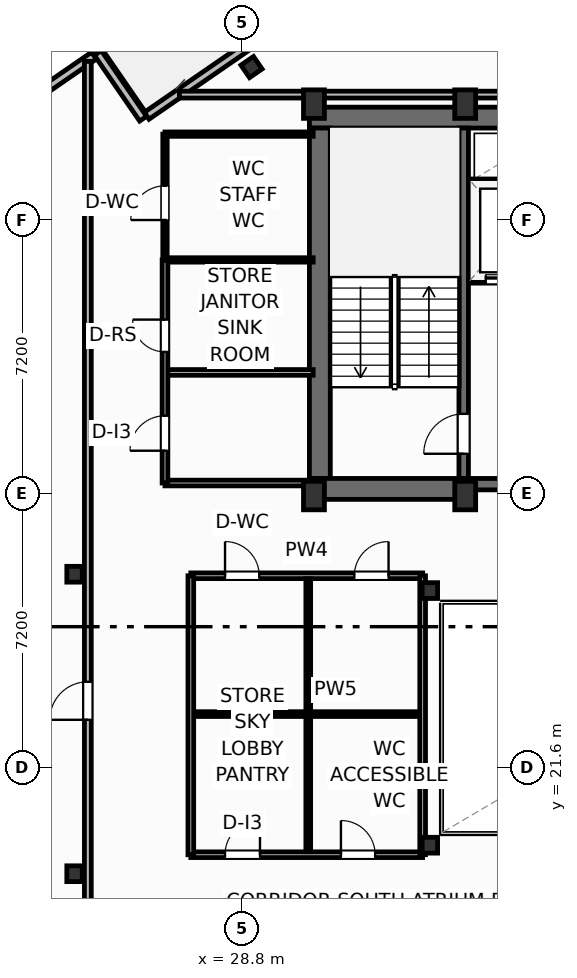
"""IFC4 building model, lengths in metres.
Left out: names, types, materials, properties, quantities, classifications, styles, units other than length and angle.
Written with IfcOpenShell. Run it as: python <this file> out.ifc"""

import sys

from ifc_helpers import new_model, si_unit, direction, frame, frame_2d, origin, origin_2d, place, context, subcontext, project, spatial, rectangle, i_section, extrude, element, fill, save


model = new_model("IFC4")
c1 = context("Model", 3, precision=1e-05, world=origin(), true_north=direction((0.0, 1.0)))
c2 = subcontext(c1, "Body", "Model", "MODEL_VIEW")
j1 = project(units=[si_unit("LENGTHUNIT", "METRE"), si_unit("PLANEANGLEUNIT", "RADIAN")], contexts=[c1])
p1 = place(None, origin())
s1 = spatial("IfcSite", under=j1, at=p1, CompositionType="ELEMENT")
p2 = place(p1, origin())
s2 = spatial("IfcBuilding", under=s1, at=p2, CompositionType="ELEMENT")
p3 = place(p2, frame((0.0, 0.0, 287.8)))
s3 = spatial("IfcBuildingStorey", under=s2, at=p3, CompositionType="ELEMENT", Elevation=287.8)
for number, where, z_axis, x_axis in (
    (1, (30.7, 28.75, 0.0), (0.0, 0.0, 1.0), (1.0, 0.0, 0.0)),
    (2, (34.68, 28.75, 0.0), (0.0, 0.0, 1.0), (1.0, 0.0, 0.0)),
    (3, (30.7, 39.05, 0.0), (0.0, 0.0, 1.0), (1.0, 0.0, 0.0)),
    (4, (34.68, 39.05, 0.0), (0.0, 0.0, 1.0), (1.0, 0.0, 0.0)),
):
    element("IfcColumn", number, at=place(p3, frame(where, z_axis=z_axis, x_axis=x_axis)), inside=s3, PredefinedType="COLUMN", context=c2, shape_type="SweptSolid", body=[
        extrude(rectangle(XDim=0.55, YDim=0.75, at=origin_2d()), origin(), (0.0, 0.0, 1.0), 3.7),
    ])
for number, where, z_axis, x_axis in (
    (5, (33.75, 19.55, 0.0), (0.0, 0.0, 1.0), (1.0, 0.0, 0.0)),
    (6, (33.75, 26.25, 0.0), (0.0, 0.0, 1.0), (1.0, 0.0, 0.0)),
    (7, (24.4, 18.8, 0.0), (0.0, 0.0, 1.0), (1.0, 0.0, 0.0)),
    (8, (24.4, 26.68, 0.0), (0.0, 0.0, 1.0), (1.0, 0.0, 0.0)),
):
    element("IfcColumn", number, at=place(p3, frame(where, z_axis=z_axis, x_axis=x_axis)), inside=s3, PredefinedType="COLUMN", context=c2, shape_type="SweptSolid", body=[
        extrude(i_section(OverallWidth=0.406, OverallDepth=0.416, WebThickness=0.03, FlangeThickness=0.048, FilletRadius=0.025, at=origin_2d()), origin(), (0.0, 0.0, 1.0), 3.7),
    ])
p4 = place(p3, frame((30.58, 38.695, 0.0), z_axis=(0.0, 0.0, 1.0), x_axis=(1.0, 0.0, 0.0)))
e9 = element("IfcWall", 9, at=p4, inside=s3, PredefinedType="SHEAR", context=c2, shape_type="SweptSolid", body=[
    extrude(rectangle(XDim=17.24, YDim=0.55, at=frame_2d((8.62, 0.0))), origin(), (0.0, 0.0, 1.0), 3.38),
])
p5 = place(p3, frame((30.855, 29.2, 0.0), z_axis=(0.0, 0.0, 1.0), x_axis=(0.0, 1.0, 0.0)))
e10 = element("IfcWall", 10, at=p5, inside=s3, PredefinedType="SHEAR", context=c2, shape_type="SweptSolid", body=[
    extrude(rectangle(XDim=9.22, YDim=0.55, at=frame_2d((4.61, 0.0))), origin(), (0.0, 0.0, 1.0), 3.38),
])
p6 = place(p3, frame((30.58, 28.925, 0.0), z_axis=(0.0, 0.0, 1.0), x_axis=(1.0, 0.0, 0.0)))
e11 = element("IfcWall", 11, at=p6, inside=s3, PredefinedType="SHEAR", context=c2, shape_type="SweptSolid", body=[
    extrude(rectangle(XDim=4.22, YDim=0.55, at=frame_2d((2.11, 0.0))), origin(), (0.0, 0.0, 1.0), 3.38),
])
p7 = place(p3, frame((34.8, 29.05, 0.0), z_axis=(0.0, 0.0, 1.0), x_axis=(1.0, 0.0, 0.0)))
e12 = element("IfcWall", 12, at=p7, inside=s3, PredefinedType="SHEAR", context=c2, shape_type="SweptSolid", body=[
    extrude(rectangle(XDim=8.8, YDim=0.3, at=frame_2d((4.4, 0.0))), origin(), (0.0, 0.0, 1.0), 3.38),
])
p8 = place(p7, frame((0.95, 0.0, 0.0)))
e13 = element("IfcOpeningElement", 13, at=p8, cuts=e12, PredefinedType="OPENING", context=c2, shape_type="SweptSolid", body=[
    extrude(rectangle(XDim=1.1, YDim=2.15, at=frame_2d((0.55, 1.075))), frame((0.0, 0.16, 0.0), z_axis=(0.0, -1.0, 0.0), x_axis=(1.0, 0.0, 0.0)), (0.0, 0.0, 1.0), 0.32),
])
p9 = place(p7, frame((6.75, 0.0, 0.0)))
e14 = element("IfcOpeningElement", 14, at=p9, cuts=e12, PredefinedType="OPENING", context=c2, shape_type="SweptSolid", body=[
    extrude(rectangle(XDim=1.1, YDim=2.15, at=frame_2d((0.55, 1.075))), frame((0.0, 0.16, 0.0), z_axis=(0.0, -1.0, 0.0), x_axis=(1.0, 0.0, 0.0)), (0.0, 0.0, 1.0), 0.32),
])
p10 = place(p7, frame((4.45, 0.0, 0.0)))
e15 = element("IfcOpeningElement", 15, at=p10, cuts=e12, PredefinedType="OPENING", context=c2, shape_type="SweptSolid", body=[
    extrude(rectangle(XDim=0.95, YDim=2.15, at=frame_2d((0.475, 1.075))), frame((0.0, 0.16, 0.0), z_axis=(0.0, -1.0, 0.0), x_axis=(1.0, 0.0, 0.0)), (0.0, 0.0, 1.0), 0.32),
])
p11 = place(p3, frame((34.64, 29.2, 0.0), z_axis=(0.0, 0.0, 1.0), x_axis=(0.0, 1.0, 0.0)))
e16 = element("IfcWall", 16, at=p11, inside=s3, PredefinedType="SHEAR", context=c2, shape_type="SweptSolid", body=[
    extrude(rectangle(XDim=9.22, YDim=0.25, at=frame_2d((4.61, 0.0))), origin(), (0.0, 0.0, 1.0), 3.38),
])
p12 = place(p11, frame((0.65, 0.0, 0.0)))
e17 = element("IfcOpeningElement", 17, at=p12, cuts=e16, PredefinedType="OPENING", context=c2, shape_type="SweptSolid", body=[
    extrude(rectangle(XDim=1.05, YDim=2.15, at=frame_2d((0.525, 1.075))), frame((0.0, 0.135, 0.0), z_axis=(0.0, -1.0, 0.0), x_axis=(1.0, 0.0, 0.0)), (0.0, 0.0, 1.0), 0.27),
])
p13 = place(p3, frame((29.057, 40.025, 0.0), z_axis=(0.0, 0.0, 1.0), x_axis=(0.823532597628, 0.567268949127, 0.0)))
e18 = element("IfcColumn", 18, at=p13, inside=s3, PredefinedType="COLUMN", context=c2, shape_type="SweptSolid", body=[
    extrude(i_section(OverallWidth=0.401, OverallDepth=0.399, WebThickness=0.025, FlangeThickness=0.04, FilletRadius=0.022, at=origin_2d()), origin(), (0.0, 0.0, 1.0), 3.7),
])
p14 = place(p3, frame((26.297, 38.743, 0.0), z_axis=(0.0, 0.0, 1.0), x_axis=(0.823534636215, 0.567265989598, 0.0)))
e19 = element("IfcWall", 19, at=p14, inside=s3, PredefinedType="SOLIDWALL", context=c2, shape_type="SweptSolid", body=[
    extrude(rectangle(XDim=6.0, YDim=0.22, at=frame_2d((3.0, 0.0))), origin(), (0.0, 0.0, 1.0), 2.66),
])
p15 = place(p14, frame((3.5, 0.0, 0.0)))
e20 = element("IfcOpeningElement", 20, at=p15, cuts=e19, PredefinedType="OPENING", context=c2, shape_type="SweptSolid", body=[
    extrude(rectangle(XDim=2.1, YDim=2.3, at=frame_2d((1.05, 1.15))), frame((0.0, 0.12, 0.0), z_axis=(0.0, -1.0, 0.0), x_axis=(1.0, 0.0, 0.0)), (0.0, 0.0, 1.0), 0.24),
])
p16 = place(p3, frame((26.204, 38.667, 0.0), z_axis=(0.0, 0.0, 1.0), x_axis=(-0.567219383419, 0.823566737474, 0.0)))
e21 = element("IfcWall", 21, at=p16, inside=s3, PredefinedType="SOLIDWALL", context=c2, shape_type="SweptSolid", body=[
    extrude(rectangle(XDim=2.1, YDim=0.22, at=frame_2d((1.05, 0.0))), origin(), (0.0, 0.0, 1.0), 2.66),
])
p17 = place(p3, frame((24.91, 40.325, 0.0), z_axis=(0.0, 0.0, 1.0), x_axis=(-0.823521165086, -0.56728554596, 0.0)))
e22 = element("IfcWall", 22, at=p17, inside=s3, PredefinedType="SOLIDWALL", context=c2, shape_type="SweptSolid", body=[
    extrude(rectangle(XDim=8.035, YDim=0.22, at=frame_2d((4.018, 0.0))), origin(), (0.0, 0.0, 1.0), 2.66),
])
p18 = place(p17, frame((2.817, 0.0, 0.8)))
e23 = element("IfcOpeningElement", 23, at=p18, cuts=e22, PredefinedType="OPENING", context=c2, shape_type="SweptSolid", body=[
    extrude(rectangle(XDim=2.4, YDim=1.78, at=frame_2d((1.2, 0.89))), frame((0.0, 0.12, 0.0), z_axis=(0.0, -1.0, 0.0), x_axis=(1.0, 0.0, 0.0)), (0.0, 0.0, 1.0), 0.24),
])
p19 = place(p3, frame((27.46, 26.64, 0.0), z_axis=(0.0, 0.0, 1.0), x_axis=(1.0, 0.0, 0.0)))
e24 = element("IfcWall", 24, at=p19, inside=s3, PredefinedType="PARTITIONING", context=c2, shape_type="SweptSolid", body=[
    extrude(rectangle(XDim=6.1, YDim=0.15, at=frame_2d((3.05, 0.0))), origin(), (0.0, 0.0, 1.0), 2.592),
])
p20 = place(p19, frame((0.9, 0.0, 0.0)))
e25 = element("IfcOpeningElement", 25, at=p20, cuts=e24, PredefinedType="OPENING", context=c2, shape_type="SweptSolid", body=[
    extrude(rectangle(XDim=0.9, YDim=2.05, at=frame_2d((0.45, 1.025))), frame((0.0, 0.085, 0.0), z_axis=(0.0, -1.0, 0.0), x_axis=(1.0, 0.0, 0.0)), (0.0, 0.0, 1.0), 0.17),
])
p21 = place(p19, frame((4.303, 0.0, 0.0)))
e26 = element("IfcOpeningElement", 26, at=p21, cuts=e24, PredefinedType="OPENING", context=c2, shape_type="SweptSolid", body=[
    extrude(rectangle(XDim=0.9, YDim=2.05, at=frame_2d((0.45, 1.025))), frame((0.0, 0.085, 0.0), z_axis=(0.0, -1.0, 0.0), x_axis=(1.0, 0.0, 0.0)), (0.0, 0.0, 1.0), 0.17),
])
p22 = place(p3, frame((27.46, 19.3, 0.0), z_axis=(0.0, 0.0, 1.0), x_axis=(1.0, 0.0, 0.0)))
e27 = element("IfcWall", 27, at=p22, inside=s3, PredefinedType="PARTITIONING", context=c2, shape_type="SweptSolid", body=[
    extrude(rectangle(XDim=6.1, YDim=0.15, at=frame_2d((3.05, 0.0))), origin(), (0.0, 0.0, 1.0), 2.592),
])
p23 = place(p22, frame((0.9, 0.0, 0.0)))
e28 = element("IfcOpeningElement", 28, at=p23, cuts=e27, PredefinedType="OPENING", context=c2, shape_type="SweptSolid", body=[
    extrude(rectangle(XDim=0.92, YDim=2.05, at=frame_2d((0.46, 1.025))), frame((0.0, 0.085, 0.0), z_axis=(0.0, -1.0, 0.0), x_axis=(1.0, 0.0, 0.0)), (0.0, 0.0, 1.0), 0.17),
])
p24 = place(p22, frame((3.95, 0.0, 0.0)))
e29 = element("IfcOpeningElement", 29, at=p24, cuts=e27, PredefinedType="OPENING", context=c2, shape_type="SweptSolid", body=[
    extrude(rectangle(XDim=0.9, YDim=2.05, at=frame_2d((0.45, 1.025))), frame((0.0, 0.085, 0.0), z_axis=(0.0, -1.0, 0.0), x_axis=(1.0, 0.0, 0.0)), (0.0, 0.0, 1.0), 0.17),
])
p25 = place(p3, frame((30.55, 19.38, 0.0), z_axis=(0.0, 0.0, 1.0), x_axis=(0.0, 1.0, 0.0)))
e30 = element("IfcWall", 30, at=p25, inside=s3, PredefinedType="PARTITIONING", context=c2, shape_type="SweptSolid", body=[
    extrude(rectangle(XDim=7.18, YDim=0.125, at=frame_2d((3.59, 0.0))), origin(), (0.0, 0.0, 1.0), 3.38),
])
p26 = place(p3, frame((27.52, 23.0, 0.0), z_axis=(0.0, 0.0, 1.0), x_axis=(1.0, 0.0, 0.0)))
e31 = element("IfcWall", 31, at=p26, inside=s3, PredefinedType="PARTITIONING", context=c2, shape_type="SweptSolid", body=[
    extrude(rectangle(XDim=6.0, YDim=0.125, at=frame_2d((3.0, 0.0))), origin(), (0.0, 0.0, 1.0), 3.38),
])
p27 = place(p3, frame((27.46, 19.3, 0.0), z_axis=(0.0, 0.0, 1.0), x_axis=(0.0, 1.0, 0.0)))
e32 = element("IfcWall", 32, at=p27, inside=s3, PredefinedType="PARTITIONING", context=c2, shape_type="SweptSolid", body=[
    extrude(rectangle(XDim=7.34, YDim=0.15, at=frame_2d((3.67, 0.0))), origin(), (0.0, 0.0, 1.0), 3.38),
])
p28 = place(p3, frame((33.56, 19.3, 0.0), z_axis=(0.0, 0.0, 1.0), x_axis=(0.0, 1.0, 0.0)))
e33 = element("IfcWall", 33, at=p28, inside=s3, PredefinedType="PARTITIONING", context=c2, shape_type="SweptSolid", body=[
    extrude(rectangle(XDim=7.34, YDim=0.15, at=frame_2d((3.67, 0.0))), origin(), (0.0, 0.0, 1.0), 2.754),
])
p29 = place(p3, frame((24.75, 16.85, 0.0), z_axis=(0.0, 0.0, 1.0), x_axis=(0.0, 1.0, 0.0)))
e34 = element("IfcWall", 34, at=p29, inside=s3, PredefinedType="PARTITIONING", context=c2, shape_type="SweptSolid", body=[
    extrude(rectangle(XDim=23.325, YDim=0.18, at=frame_2d((11.663, 0.0))), origin(), (0.0, 0.0, 1.0), 3.38),
])
p30 = place(p29, frame((6.0, 0.0, 0.0)))
e35 = element("IfcOpeningElement", 35, at=p30, cuts=e34, PredefinedType="OPENING", context=c2, shape_type="SweptSolid", body=[
    extrude(rectangle(XDim=1.0, YDim=2.05, at=frame_2d((0.5, 1.025))), frame((0.0, 0.1, 0.0), z_axis=(0.0, -1.0, 0.0), x_axis=(1.0, 0.0, 0.0)), (0.0, 0.0, 1.0), 0.2),
])
p31 = place(p3, frame((27.159, 39.3, 0.0), z_axis=(0.0, 0.0, 1.0), x_axis=(1.0, 0.0, 0.0)))
e36 = element("IfcWall", 36, at=p31, inside=s3, PredefinedType="PARTITIONING", context=c2, shape_type="SweptSolid", body=[
    extrude(rectangle(XDim=8.561, YDim=0.18, at=frame_2d((4.281, 0.0))), origin(), (0.0, 0.0, 1.0), 3.38),
])
p32 = place(p3, frame((34.8, 34.44, 0.0), z_axis=(0.0, 0.0, 1.0), x_axis=(1.0, 0.0, 0.0)))
e37 = element("IfcWall", 37, at=p32, inside=s3, PredefinedType="PARTITIONING", context=c2, shape_type="SweptSolid", body=[
    extrude(rectangle(XDim=2.18, YDim=0.2, at=frame_2d((1.09, 0.0))), origin(), (0.0, 0.0, 1.0), 3.38),
])
p33 = place(p32, frame((0.42, 0.0, 0.0)))
e38 = element("IfcOpeningElement", 38, at=p33, cuts=e37, PredefinedType="OPENING", context=c2, shape_type="SweptSolid", body=[
    extrude(rectangle(XDim=1.2, YDim=2.2, at=frame_2d((0.6, 1.1))), frame((0.0, 0.11, 0.0), z_axis=(0.0, -1.0, 0.0), x_axis=(1.0, 0.0, 0.0)), (0.0, 0.0, 1.0), 0.22),
])
p34 = place(p3, frame((34.8, 36.98, 0.0), z_axis=(0.0, 0.0, 1.0), x_axis=(1.0, 0.0, 0.0)))
e39 = element("IfcWall", 39, at=p34, inside=s3, PredefinedType="PARTITIONING", context=c2, shape_type="SweptSolid", body=[
    extrude(rectangle(XDim=2.18, YDim=0.2, at=frame_2d((1.09, 0.0))), origin(), (0.0, 0.0, 1.0), 3.38),
])
p35 = place(p3, frame((26.78, 29.08, 0.0), z_axis=(0.0, 0.0, 1.0), x_axis=(1.0, 0.0, 0.0)))
e40 = element("IfcWall", 40, at=p35, inside=s3, PredefinedType="PARTITIONING", context=c2, shape_type="SweptSolid", body=[
    extrude(rectangle(XDim=3.8, YDim=0.15, at=frame_2d((1.9, 0.0))), origin(), (0.0, 0.0, 1.0), 3.38),
])
p36 = place(p3, frame((26.8, 31.99, 0.0), z_axis=(0.0, 0.0, 1.0), x_axis=(1.0, 0.0, 0.0)))
e41 = element("IfcWall", 41, at=p36, inside=s3, PredefinedType="PARTITIONING", context=c2, shape_type="SweptSolid", body=[
    extrude(rectangle(XDim=3.88, YDim=0.15, at=frame_2d((1.94, 0.0))), origin(), (0.0, 0.0, 1.0), 3.38),
])
p37 = place(p3, frame((26.8, 34.95, 0.0), z_axis=(0.0, 0.0, 1.0), x_axis=(1.0, 0.0, 0.0)))
e42 = element("IfcWall", 42, at=p37, inside=s3, PredefinedType="PARTITIONING", context=c2, shape_type="SweptSolid", body=[
    extrude(rectangle(XDim=3.88, YDim=0.115, at=frame_2d((1.94, 0.0))), origin(), (0.0, 0.0, 1.0), 3.38),
])
p38 = place(p3, frame((26.78, 38.26, 0.0), z_axis=(0.0, 0.0, 1.0), x_axis=(1.0, 0.0, 0.0)))
e43 = element("IfcWall", 43, at=p38, inside=s3, PredefinedType="PARTITIONING", context=c2, shape_type="SweptSolid", body=[
    extrude(rectangle(XDim=3.9, YDim=0.115, at=frame_2d((1.95, 0.0))), origin(), (0.0, 0.0, 1.0), 3.38),
])
p39 = place(p3, frame((26.78, 29.08, 0.0), z_axis=(0.0, 0.0, 1.0), x_axis=(0.0, 1.0, 0.0)))
e44 = element("IfcWall", 44, at=p39, inside=s3, PredefinedType="PARTITIONING", context=c2, shape_type="SweptSolid", body=[
    extrude(rectangle(XDim=5.87, YDim=0.15, at=frame_2d((2.935, 0.0))), origin(), (0.0, 0.0, 1.0), 3.38),
])
p40 = place(p39, frame((0.85, 0.0, 0.0)))
e45 = element("IfcOpeningElement", 45, at=p40, cuts=e44, PredefinedType="OPENING", context=c2, shape_type="SweptSolid", body=[
    extrude(rectangle(XDim=0.92, YDim=2.05, at=frame_2d((0.46, 1.025))), frame((0.0, 0.085, 0.0), z_axis=(0.0, -1.0, 0.0), x_axis=(1.0, 0.0, 0.0)), (0.0, 0.0, 1.0), 0.17),
])
p41 = place(p39, frame((3.45, 0.0, 0.0)))
e46 = element("IfcOpeningElement", 46, at=p41, cuts=e44, PredefinedType="OPENING", context=c2, shape_type="SweptSolid", body=[
    extrude(rectangle(XDim=0.85, YDim=2.05, at=frame_2d((0.425, 1.025))), frame((0.0, 0.085, 0.0), z_axis=(0.0, -1.0, 0.0), x_axis=(1.0, 0.0, 0.0)), (0.0, 0.0, 1.0), 0.17),
])
p42 = place(p3, frame((26.78, 34.95, 0.0), z_axis=(0.0, 0.0, 1.0), x_axis=(0.0, 1.0, 0.0)))
e47 = element("IfcWall", 47, at=p42, inside=s3, PredefinedType="PARTITIONING", context=c2, shape_type="SweptSolid", body=[
    extrude(rectangle(XDim=3.31, YDim=0.115, at=frame_2d((1.655, 0.0))), origin(), (0.0, 0.0, 1.0), 3.38),
])
p43 = place(p42, frame((1.05, 0.0, 0.0)))
e48 = element("IfcOpeningElement", 48, at=p43, cuts=e47, PredefinedType="OPENING", context=c2, shape_type="SweptSolid", body=[
    extrude(rectangle(XDim=0.9, YDim=2.05, at=frame_2d((0.45, 1.025))), frame((0.0, 0.067, 0.0), z_axis=(0.0, -1.0, 0.0), x_axis=(1.0, 0.0, 0.0)), (0.0, 0.0, 1.0), 0.135),
])
p44 = place(p20, origin())
e49 = element("IfcDoor", 49, at=p44, inside=s3, OperationType="SINGLE_SWING_LEFT", PredefinedType="DOOR", context=c2, shape_type="SweptSolid", body=[
    extrude(rectangle(XDim=0.9, YDim=2.05, at=frame_2d((0.45, 1.025))), frame((0.0, 0.025, 0.0), z_axis=(0.0, -1.0, 0.0), x_axis=(1.0, 0.0, 0.0)), (0.0, 0.0, 1.0), 0.05),
])
fill(e25, e49)
p45 = place(p21, origin())
e50 = element("IfcDoor", 50, at=p45, inside=s3, OperationType="SINGLE_SWING_RIGHT", PredefinedType="DOOR", context=c2, shape_type="SweptSolid", body=[
    extrude(rectangle(XDim=0.9, YDim=2.05, at=frame_2d((0.45, 1.025))), frame((0.0, 0.025, 0.0), z_axis=(0.0, -1.0, 0.0), x_axis=(1.0, 0.0, 0.0)), (0.0, 0.0, 1.0), 0.05),
])
fill(e26, e50)
p46 = place(p23, origin())
e51 = element("IfcDoor", 51, at=p46, inside=s3, OperationType="SINGLE_SWING_RIGHT", PredefinedType="DOOR", context=c2, shape_type="SweptSolid", body=[
    extrude(rectangle(XDim=0.92, YDim=2.05, at=frame_2d((0.46, 1.025))), frame((0.0, 0.025, 0.0), z_axis=(0.0, -1.0, 0.0), x_axis=(1.0, 0.0, 0.0)), (0.0, 0.0, 1.0), 0.05),
])
fill(e28, e51)
p47 = place(p24, origin())
e52 = element("IfcDoor", 52, at=p47, inside=s3, OperationType="SINGLE_SWING_LEFT", PredefinedType="DOOR", context=c2, shape_type="SweptSolid", body=[
    extrude(rectangle(XDim=0.9, YDim=2.05, at=frame_2d((0.45, 1.025))), frame((0.0, 0.025, 0.0), z_axis=(0.0, -1.0, 0.0), x_axis=(1.0, 0.0, 0.0)), (0.0, 0.0, 1.0), 0.05),
])
fill(e29, e52)
p48 = place(p30, origin())
e53 = element("IfcDoor", 53, at=p48, inside=s3, OperationType="SINGLE_SWING_LEFT", PredefinedType="DOOR", context=c2, shape_type="SweptSolid", body=[
    extrude(rectangle(XDim=1.0, YDim=2.05, at=frame_2d((0.5, 1.025))), frame((0.0, 0.025, 0.0), z_axis=(0.0, -1.0, 0.0), x_axis=(1.0, 0.0, 0.0)), (0.0, 0.0, 1.0), 0.05),
])
fill(e35, e53)
p49 = place(p12, origin())
e54 = element("IfcDoor", 54, at=p49, inside=s3, OperationType="SINGLE_SWING_LEFT", PredefinedType="DOOR", context=c2, shape_type="SweptSolid", body=[
    extrude(rectangle(XDim=1.05, YDim=2.15, at=frame_2d((0.525, 1.075))), frame((0.0, 0.025, 0.0), z_axis=(0.0, -1.0, 0.0), x_axis=(1.0, 0.0, 0.0)), (0.0, 0.0, 1.0), 0.05),
])
fill(e17, e54)
p50 = place(p33, origin())
e55 = element("IfcDoor", 55, at=p50, inside=s3, OperationType="SLIDING_TO_LEFT", PredefinedType="DOOR", context=c2, shape_type="SweptSolid", body=[
    extrude(rectangle(XDim=1.2, YDim=2.2, at=frame_2d((0.6, 1.1))), frame((0.0, 0.025, 0.0), z_axis=(0.0, -1.0, 0.0), x_axis=(1.0, 0.0, 0.0)), (0.0, 0.0, 1.0), 0.05),
])
fill(e38, e55)
p51 = place(p40, origin())
e56 = element("IfcDoor", 56, at=p51, inside=s3, OperationType="SINGLE_SWING_LEFT", PredefinedType="DOOR", context=c2, shape_type="SweptSolid", body=[
    extrude(rectangle(XDim=0.92, YDim=2.05, at=frame_2d((0.46, 1.025))), frame((0.0, 0.025, 0.0), z_axis=(0.0, -1.0, 0.0), x_axis=(1.0, 0.0, 0.0)), (0.0, 0.0, 1.0), 0.05),
])
fill(e45, e56)
p52 = place(p41, origin())
e57 = element("IfcDoor", 57, at=p52, inside=s3, OperationType="SINGLE_SWING_RIGHT", PredefinedType="DOOR", context=c2, shape_type="SweptSolid", body=[
    extrude(rectangle(XDim=0.85, YDim=2.05, at=frame_2d((0.425, 1.025))), frame((0.0, 0.025, 0.0), z_axis=(0.0, -1.0, 0.0), x_axis=(1.0, 0.0, 0.0)), (0.0, 0.0, 1.0), 0.05),
])
fill(e46, e57)
p53 = place(p43, origin())
e58 = element("IfcDoor", 58, at=p53, inside=s3, OperationType="SINGLE_SWING_LEFT", PredefinedType="DOOR", context=c2, shape_type="SweptSolid", body=[
    extrude(rectangle(XDim=0.9, YDim=2.05, at=frame_2d((0.45, 1.025))), frame((0.0, 0.025, 0.0), z_axis=(0.0, -1.0, 0.0), x_axis=(1.0, 0.0, 0.0)), (0.0, 0.0, 1.0), 0.05),
])
fill(e48, e58)
save(model, sys.argv[1])
